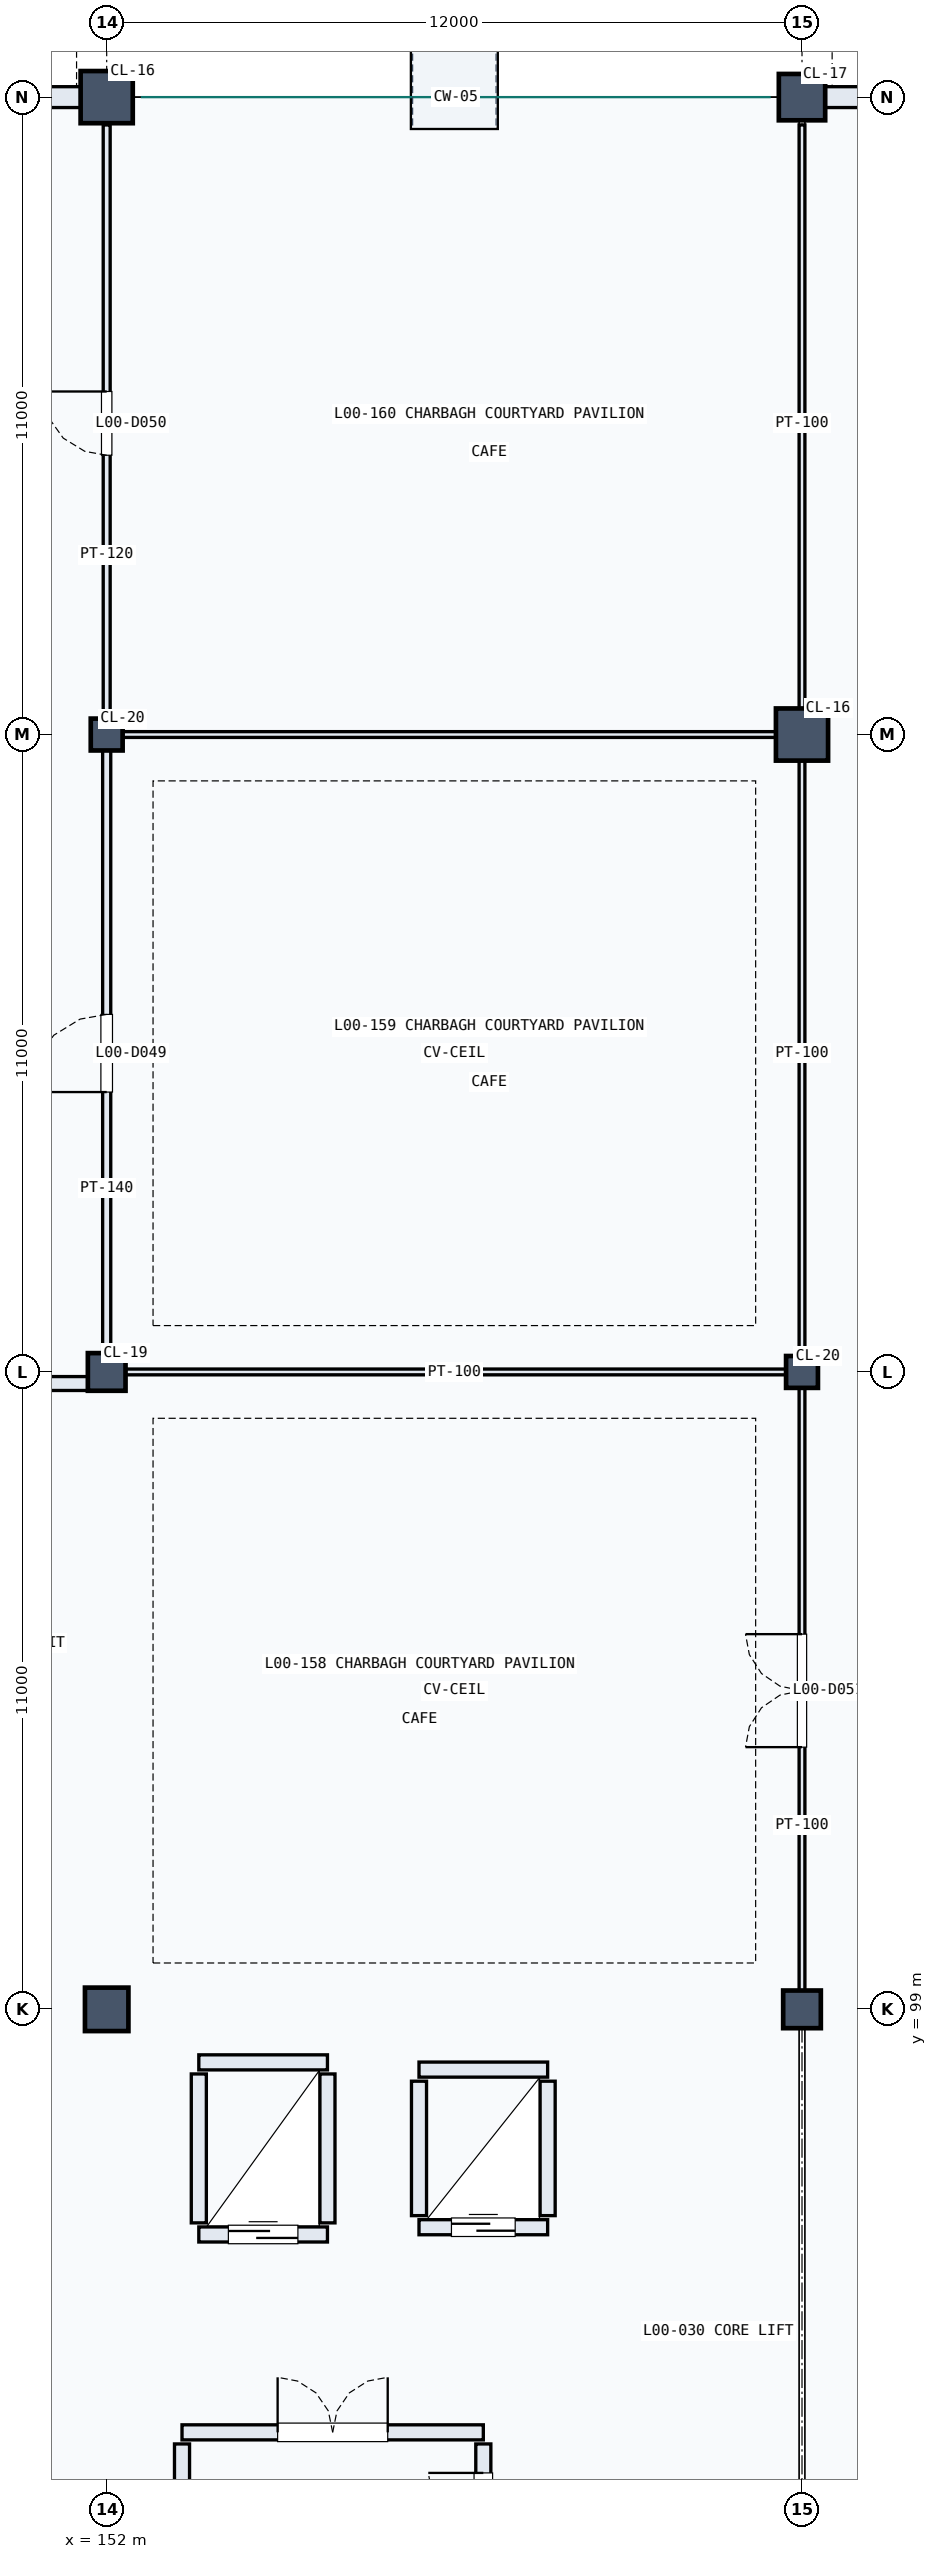
"""IFC4 building model, lengths in metres.
Left out: names, types, materials, properties, quantities, classifications, styles, units other than length and angle.
Written with IfcOpenShell. Run it as: python <this file> out.ifc"""

import sys

from ifc_helpers import new_model, si_unit, direction, frame, frame_2d, origin, origin_2d, place, context, subcontext, project, spatial, rectangle, circle, extrude, element, fill, save


model = new_model("IFC4")
c1 = context("Model", 3, precision=1e-05, world=origin(), true_north=direction((0.0, 1.0)))
c2 = subcontext(c1, "Body", "Model", "MODEL_VIEW")
j1 = project(units=[si_unit("LENGTHUNIT", "METRE"), si_unit("PLANEANGLEUNIT", "RADIAN")], contexts=[c1])
p1 = place(None, origin())
s1 = spatial("IfcSite", under=j1, at=p1, CompositionType="ELEMENT")
p2 = place(p1, origin())
s2 = spatial("IfcBuilding", under=s1, at=p2, CompositionType="ELEMENT")
p3 = place(p2, origin())
s3 = spatial("IfcBuildingStorey", under=s2, at=p3, CompositionType="ELEMENT", Elevation=0.0)
p4 = place(p3, frame((152.0, 99.0, 0.0), z_axis=(0.0, 0.0, 1.0), x_axis=(1.0, 0.0, 0.0)))
e1 = element("IfcColumn", 1, at=p4, inside=s3, PredefinedType="COLUMN", context=c2, shape_type="SweptSolid", body=[
    extrude(circle(Radius=0.375, at=origin_2d()), origin(), (0.0, 0.0, 1.0), 5.4),
])
p5 = place(p3, frame((152.0, 110.0, 0.0), z_axis=(0.0, 0.0, 1.0), x_axis=(1.0, 0.0, 0.0)))
e2 = element("IfcColumn", 2, at=p5, inside=s3, PredefinedType="COLUMN", context=c2, shape_type="SweptSolid", body=[
    extrude(circle(Radius=0.325, at=origin_2d()), origin(), (0.0, 0.0, 1.0), 5.4),
])
p6 = place(p3, frame((152.0, 121.0, 0.0), z_axis=(0.0, 0.0, 1.0), x_axis=(1.0, 0.0, 0.0)))
e3 = element("IfcColumn", 3, at=p6, inside=s3, PredefinedType="COLUMN", context=c2, shape_type="SweptSolid", body=[
    extrude(circle(Radius=0.275, at=origin_2d()), origin(), (0.0, 0.0, 1.0), 5.4),
])
p7 = place(p3, frame((152.0, 132.0, 0.0), z_axis=(0.0, 0.0, 1.0), x_axis=(1.0, 0.0, 0.0)))
e4 = element("IfcColumn", 4, at=p7, inside=s3, PredefinedType="COLUMN", context=c2, shape_type="SweptSolid", body=[
    extrude(circle(Radius=0.45, at=origin_2d()), origin(), (0.0, 0.0, 1.0), 5.4),
])
p8 = place(p3, frame((164.0, 99.0, 0.0), z_axis=(0.0, 0.0, 1.0), x_axis=(1.0, 0.0, 0.0)))
e5 = element("IfcColumn", 5, at=p8, inside=s3, PredefinedType="COLUMN", context=c2, shape_type="SweptSolid", body=[
    extrude(circle(Radius=0.325, at=origin_2d()), origin(), (0.0, 0.0, 1.0), 5.4),
])
p9 = place(p3, frame((164.0, 110.0, 0.0), z_axis=(0.0, 0.0, 1.0), x_axis=(1.0, 0.0, 0.0)))
e6 = element("IfcColumn", 6, at=p9, inside=s3, PredefinedType="COLUMN", context=c2, shape_type="SweptSolid", body=[
    extrude(circle(Radius=0.275, at=origin_2d()), origin(), (0.0, 0.0, 1.0), 5.4),
])
p10 = place(p3, frame((164.0, 121.0, 0.0), z_axis=(0.0, 0.0, 1.0), x_axis=(1.0, 0.0, 0.0)))
e7 = element("IfcColumn", 7, at=p10, inside=s3, PredefinedType="COLUMN", context=c2, shape_type="SweptSolid", body=[
    extrude(circle(Radius=0.45, at=origin_2d()), origin(), (0.0, 0.0, 1.0), 5.4),
])
p11 = place(p3, frame((164.0, 132.0, 0.0), z_axis=(0.0, 0.0, 1.0), x_axis=(1.0, 0.0, 0.0)))
e8 = element("IfcColumn", 8, at=p11, inside=s3, PredefinedType="COLUMN", context=c2, shape_type="SweptSolid", body=[
    extrude(circle(Radius=0.4, at=origin_2d()), origin(), (0.0, 0.0, 1.0), 5.4),
])
p12 = place(p3, frame((142.6, 132.0, 0.0), z_axis=(0.0, 0.0, 1.0), x_axis=(1.0, 0.0, 0.0)))
e9 = element("IfcWall", 9, at=p12, inside=s3, PredefinedType="SOLIDWALL", context=c2, shape_type="SweptSolid", body=[
    extrude(rectangle(XDim=9.18, YDim=0.36, at=frame_2d((4.59, 0.0))), origin(), (0.0, 0.0, 1.0), 5.065),
])
p13 = place(p12, frame((2.99, 0.0, 1.1)))
e10 = element("IfcOpeningElement", 10, at=p13, cuts=e9, PredefinedType="OPENING", context=c2, shape_type="SweptSolid", body=[
    extrude(rectangle(XDim=3.2, YDim=1.4, at=frame_2d((1.6, 0.7))), frame((0.0, 0.19, 0.0), z_axis=(0.0, -1.0, 0.0), x_axis=(1.0, 0.0, 0.0)), (0.0, 0.0, 1.0), 0.38),
])
p14 = place(p3, frame((164.22, 132.0, 0.0), z_axis=(0.0, 0.0, 1.0), x_axis=(1.0, 0.0, 0.0)))
e11 = element("IfcWall", 11, at=p14, inside=s3, PredefinedType="SOLIDWALL", context=c2, shape_type="SweptSolid", body=[
    extrude(rectangle(XDim=11.56, YDim=0.36, at=frame_2d((5.78, 0.0))), origin(), (0.0, 0.0, 1.0), 5.065),
])
p15 = place(p14, frame((1.756, 0.0, 0.0)))
e12 = element("IfcOpeningElement", 12, at=p15, cuts=e11, PredefinedType="OPENING", context=c2, shape_type="SweptSolid", body=[
    extrude(rectangle(XDim=2.2, YDim=2.35, at=frame_2d((1.1, 1.175))), frame((0.0, 0.19, 0.0), z_axis=(0.0, -1.0, 0.0), x_axis=(1.0, 0.0, 0.0)), (0.0, 0.0, 1.0), 0.38),
])
p16 = place(p14, frame((7.304, 0.0, 0.0)))
e13 = element("IfcOpeningElement", 13, at=p16, cuts=e11, PredefinedType="OPENING", context=c2, shape_type="SweptSolid", body=[
    extrude(rectangle(XDim=1.8, YDim=2.3, at=frame_2d((0.9, 1.15))), frame((0.0, 0.19, 0.0), z_axis=(0.0, -1.0, 0.0), x_axis=(1.0, 0.0, 0.0)), (0.0, 0.0, 1.0), 0.38),
])
p17 = place(p14, frame((5.33, 0.0, 0.8)))
e14 = element("IfcOpeningElement", 14, at=p17, cuts=e11, PredefinedType="OPENING", context=c2, shape_type="SweptSolid", body=[
    extrude(rectangle(XDim=0.9, YDim=1.8, at=frame_2d((0.45, 0.9))), frame((0.0, 0.19, 0.0), z_axis=(0.0, -1.0, 0.0), x_axis=(1.0, 0.0, 0.0)), (0.0, 0.0, 1.0), 0.38),
])
p18 = place(p3, frame((153.59, 95.115, 0.0), z_axis=(0.0, 0.0, 1.0), x_axis=(1.0, 0.0, 0.0)))
e15 = element("IfcWall", 15, at=p18, inside=s3, PredefinedType="SOLIDWALL", context=c2, shape_type="SweptSolid", body=[
    extrude(rectangle(XDim=2.22, YDim=0.26, at=frame_2d((1.11, 0.0))), origin(), (0.0, 0.0, 1.0), 5.06),
])
p19 = place(p18, frame((0.51, 0.0, 0.0)))
e16 = element("IfcOpeningElement", 16, at=p19, cuts=e15, PredefinedType="OPENING", context=c2, shape_type="SweptSolid", body=[
    extrude(rectangle(XDim=1.2, YDim=2.2, at=frame_2d((0.6, 1.1))), frame((0.0, 0.14, 0.0), z_axis=(0.0, -1.0, 0.0), x_axis=(1.0, 0.0, 0.0)), (0.0, 0.0, 1.0), 0.28),
])
p20 = place(p3, frame((153.59, 98.085, 0.0), z_axis=(0.0, 0.0, 1.0), x_axis=(1.0, 0.0, 0.0)))
e17 = element("IfcWall", 17, at=p20, inside=s3, PredefinedType="SOLIDWALL", context=c2, shape_type="SweptSolid", body=[
    extrude(rectangle(XDim=2.22, YDim=0.26, at=frame_2d((1.11, 0.0))), origin(), (0.0, 0.0, 1.0), 5.06),
])
for number, where, z_axis, x_axis in (
    (18, (153.59, 95.315, 0.0), (0.0, 0.0, 1.0), (0.0, 1.0, 0.0)),
    (19, (155.81, 95.315, 0.0), (0.0, 0.0, 1.0), (0.0, 1.0, 0.0)),
):
    element("IfcWall", number, at=place(p3, frame(where, z_axis=z_axis, x_axis=x_axis)), inside=s3, PredefinedType="SOLIDWALL", context=c2, shape_type="SweptSolid", body=[
        extrude(rectangle(XDim=2.57, YDim=0.26, at=frame_2d((1.285, 0.0))), origin(), (0.0, 0.0, 1.0), 5.06),
    ])
p21 = place(p3, frame((157.39, 95.24, 0.0), z_axis=(0.0, 0.0, 1.0), x_axis=(1.0, 0.0, 0.0)))
e20 = element("IfcWall", 20, at=p21, inside=s3, PredefinedType="SOLIDWALL", context=c2, shape_type="SweptSolid", body=[
    extrude(rectangle(XDim=2.22, YDim=0.26, at=frame_2d((1.11, 0.0))), origin(), (0.0, 0.0, 1.0), 5.06),
])
p22 = place(p21, frame((0.56, 0.0, 0.0)))
e21 = element("IfcOpeningElement", 21, at=p22, cuts=e20, PredefinedType="OPENING", context=c2, shape_type="SweptSolid", body=[
    extrude(rectangle(XDim=1.1, YDim=2.15, at=frame_2d((0.55, 1.075))), frame((0.0, 0.14, 0.0), z_axis=(0.0, -1.0, 0.0), x_axis=(1.0, 0.0, 0.0)), (0.0, 0.0, 1.0), 0.28),
])
p23 = place(p3, frame((157.39, 97.96, 0.0), z_axis=(0.0, 0.0, 1.0), x_axis=(1.0, 0.0, 0.0)))
e22 = element("IfcWall", 22, at=p23, inside=s3, PredefinedType="SOLIDWALL", context=c2, shape_type="SweptSolid", body=[
    extrude(rectangle(XDim=2.22, YDim=0.26, at=frame_2d((1.11, 0.0))), origin(), (0.0, 0.0, 1.0), 5.06),
])
for number, where, z_axis, x_axis in (
    (23, (157.39, 95.44, 0.0), (0.0, 0.0, 1.0), (0.0, 1.0, 0.0)),
    (24, (159.61, 95.44, 0.0), (0.0, 0.0, 1.0), (0.0, 1.0, 0.0)),
):
    element("IfcWall", number, at=place(p3, frame(where, z_axis=z_axis, x_axis=x_axis)), inside=s3, PredefinedType="SOLIDWALL", context=c2, shape_type="SweptSolid", body=[
        extrude(rectangle(XDim=2.32, YDim=0.26, at=frame_2d((1.16, 0.0))), origin(), (0.0, 0.0, 1.0), 5.06),
    ])
p24 = place(p3, frame((153.3, 91.7, 0.0), z_axis=(0.0, 0.0, 1.0), x_axis=(1.0, 0.0, 0.0)))
e25 = element("IfcWall", 25, at=p24, inside=s3, PredefinedType="SOLIDWALL", context=c2, shape_type="SweptSolid", body=[
    extrude(rectangle(XDim=5.2, YDim=0.26, at=frame_2d((2.6, 0.0))), origin(), (0.0, 0.0, 1.0), 5.06),
])
p25 = place(p24, frame((1.65, 0.0, 0.0)))
e26 = element("IfcOpeningElement", 26, at=p25, cuts=e25, PredefinedType="OPENING", context=c2, shape_type="SweptSolid", body=[
    extrude(rectangle(XDim=1.9, YDim=2.2, at=frame_2d((0.95, 1.1))), frame((0.0, 0.14, 0.0), z_axis=(0.0, -1.0, 0.0), x_axis=(1.0, 0.0, 0.0)), (0.0, 0.0, 1.0), 0.28),
])
p26 = place(p3, frame((153.3, 88.6, 0.0), z_axis=(0.0, 0.0, 1.0), x_axis=(0.0, 1.0, 0.0)))
e27 = element("IfcWall", 27, at=p26, inside=s3, PredefinedType="SOLIDWALL", context=c2, shape_type="SweptSolid", body=[
    extrude(rectangle(XDim=2.9, YDim=0.26, at=frame_2d((1.45, 0.0))), origin(), (0.0, 0.0, 1.0), 5.06),
])
p27 = place(p3, frame((158.5, 88.6, 0.0), z_axis=(0.0, 0.0, 1.0), x_axis=(0.0, 1.0, 0.0)))
e28 = element("IfcWall", 28, at=p27, inside=s3, PredefinedType="SOLIDWALL", context=c2, shape_type="SweptSolid", body=[
    extrude(rectangle(XDim=2.9, YDim=0.26, at=frame_2d((1.45, 0.0))), origin(), (0.0, 0.0, 1.0), 5.06),
])
p28 = place(p27, frame((0.5, 0.0, 0.0)))
e29 = element("IfcOpeningElement", 29, at=p28, cuts=e28, PredefinedType="OPENING", context=c2, shape_type="SweptSolid", body=[
    extrude(rectangle(XDim=1.9, YDim=2.2, at=frame_2d((0.95, 1.1))), frame((0.0, 0.14, 0.0), z_axis=(0.0, -1.0, 0.0), x_axis=(1.0, 0.0, 0.0)), (0.0, 0.0, 1.0), 0.28),
])
p29 = place(p3, frame((152.0, 110.22, 0.0), z_axis=(0.0, 0.0, 1.0), x_axis=(0.0, 1.0, 0.0)))
e30 = element("IfcWall", 30, at=p29, inside=s3, PredefinedType="PARTITIONING", context=c2, shape_type="SweptSolid", body=[
    extrude(rectangle(XDim=10.56, YDim=0.14, at=frame_2d((5.28, 0.0))), origin(), (0.0, 0.0, 1.0), 4.1),
])
p30 = place(p29, frame((4.61, 0.0, 0.0)))
e31 = element("IfcOpeningElement", 31, at=p30, cuts=e30, PredefinedType="OPENING", context=c2, shape_type="SweptSolid", body=[
    extrude(rectangle(XDim=1.34, YDim=2.15, at=frame_2d((0.67, 1.075))), frame((0.0, 0.08, 0.0), z_axis=(0.0, -1.0, 0.0), x_axis=(1.0, 0.0, 0.0)), (0.0, 0.0, 1.0), 0.16),
])
p31 = place(p3, frame((152.0, 121.22, 0.0), z_axis=(0.0, 0.0, 1.0), x_axis=(0.0, 1.0, 0.0)))
e32 = element("IfcWall", 32, at=p31, inside=s3, PredefinedType="PARTITIONING", context=c2, shape_type="SweptSolid", body=[
    extrude(rectangle(XDim=10.3, YDim=0.12, at=frame_2d((5.15, 0.0))), origin(), (0.0, 0.0, 1.0), 4.25),
])
p32 = place(p31, frame((4.6, 0.0, 0.0)))
e33 = element("IfcOpeningElement", 33, at=p32, cuts=e32, PredefinedType="OPENING", context=c2, shape_type="SweptSolid", body=[
    extrude(rectangle(XDim=1.1, YDim=2.1, at=frame_2d((0.55, 1.05))), frame((0.0, 0.07, 0.0), z_axis=(0.0, -1.0, 0.0), x_axis=(1.0, 0.0, 0.0)), (0.0, 0.0, 1.0), 0.14),
])
p33 = place(p3, frame((164.0, 99.22, 0.0), z_axis=(0.0, 0.0, 1.0), x_axis=(0.0, 1.0, 0.0)))
e34 = element("IfcWall", 34, at=p33, inside=s3, PredefinedType="PARTITIONING", context=c2, shape_type="SweptSolid", body=[
    extrude(rectangle(XDim=10.56, YDim=0.1, at=frame_2d((5.28, 0.0))), origin(), (0.0, 0.0, 1.0), 4.3),
])
p34 = place(p33, frame((4.305, 0.0, 0.0)))
e35 = element("IfcOpeningElement", 35, at=p34, cuts=e34, PredefinedType="OPENING", context=c2, shape_type="SweptSolid", body=[
    extrude(rectangle(XDim=1.95, YDim=2.4, at=frame_2d((0.975, 1.2))), frame((0.0, 0.06, 0.0), z_axis=(0.0, -1.0, 0.0), x_axis=(1.0, 0.0, 0.0)), (0.0, 0.0, 1.0), 0.12),
])
p35 = place(p3, frame((164.0, 110.22, 0.0), z_axis=(0.0, 0.0, 1.0), x_axis=(0.0, 1.0, 0.0)))
e36 = element("IfcWall", 36, at=p35, inside=s3, PredefinedType="PARTITIONING", context=c2, shape_type="SweptSolid", body=[
    extrude(rectangle(XDim=10.56, YDim=0.1, at=frame_2d((5.28, 0.0))), origin(), (0.0, 0.0, 1.0), 4.35),
])
p36 = place(p3, frame((164.0, 121.22, 0.0), z_axis=(0.0, 0.0, 1.0), x_axis=(0.0, 1.0, 0.0)))
e37 = element("IfcWall", 37, at=p36, inside=s3, PredefinedType="PARTITIONING", context=c2, shape_type="SweptSolid", body=[
    extrude(rectangle(XDim=10.3, YDim=0.1, at=frame_2d((5.15, 0.0))), origin(), (0.0, 0.0, 1.0), 4.45),
])
p37 = place(p3, frame((152.22, 110.0, 0.0), z_axis=(0.0, 0.0, 1.0), x_axis=(1.0, 0.0, 0.0)))
e38 = element("IfcWall", 38, at=p37, inside=s3, PredefinedType="PARTITIONING", context=c2, shape_type="SweptSolid", body=[
    extrude(rectangle(XDim=11.56, YDim=0.1, at=frame_2d((5.78, 0.0))), origin(), (0.0, 0.0, 1.0), 4.1),
])
p38 = place(p3, frame((152.22, 121.0, 0.0), z_axis=(0.0, 0.0, 1.0), x_axis=(1.0, 0.0, 0.0)))
e39 = element("IfcWall", 39, at=p38, inside=s3, PredefinedType="PARTITIONING", context=c2, shape_type="SweptSolid", body=[
    extrude(rectangle(XDim=11.56, YDim=0.1, at=frame_2d((5.78, 0.0))), origin(), (0.0, 0.0, 1.0), 4.25),
])
p39 = place(p3, frame((142.6, 109.8, 0.0), z_axis=(0.0, 0.0, 1.0), x_axis=(1.0, 0.0, 0.0)))
e40 = element("IfcWall", 40, at=p39, inside=s3, PredefinedType="PARTITIONING", context=c2, shape_type="SweptSolid", body=[
    extrude(rectangle(XDim=9.18, YDim=0.24, at=frame_2d((4.59, 0.0))), origin(), (0.0, 0.0, 1.0), 4.1),
])
p40 = place(p39, frame((3.59, 0.0, 0.0)))
e41 = element("IfcOpeningElement", 41, at=p40, cuts=e40, PredefinedType="OPENING", context=c2, shape_type="SweptSolid", body=[
    extrude(rectangle(XDim=2.0, YDim=2.25, at=frame_2d((1.0, 1.125))), frame((0.0, 0.13, 0.0), z_axis=(0.0, -1.0, 0.0), x_axis=(1.0, 0.0, 0.0)), (0.0, 0.0, 1.0), 0.26),
])
p41 = place(p19, origin())
e42 = element("IfcDoor", 42, at=p41, inside=s3, OperationType="SLIDING_TO_LEFT", PredefinedType="DOOR", context=c2, shape_type="SweptSolid", body=[
    extrude(rectangle(XDim=1.2, YDim=2.2, at=frame_2d((0.6, 1.1))), frame((0.0, 0.025, 0.0), z_axis=(0.0, -1.0, 0.0), x_axis=(1.0, 0.0, 0.0)), (0.0, 0.0, 1.0), 0.05),
])
fill(e16, e42)
p42 = place(p22, origin())
e43 = element("IfcDoor", 43, at=p42, inside=s3, OperationType="SLIDING_TO_LEFT", PredefinedType="DOOR", context=c2, shape_type="SweptSolid", body=[
    extrude(rectangle(XDim=1.1, YDim=2.15, at=frame_2d((0.55, 1.075))), frame((0.0, 0.025, 0.0), z_axis=(0.0, -1.0, 0.0), x_axis=(1.0, 0.0, 0.0)), (0.0, 0.0, 1.0), 0.05),
])
fill(e21, e43)
p43 = place(p25, origin())
e44 = element("IfcDoor", 44, at=p43, inside=s3, OperationType="DOUBLE_DOOR_SINGLE_SWING", PredefinedType="DOOR", context=c2, shape_type="SweptSolid", body=[
    extrude(rectangle(XDim=1.9, YDim=2.2, at=frame_2d((0.95, 1.1))), frame((0.0, 0.025, 0.0), z_axis=(0.0, -1.0, 0.0), x_axis=(1.0, 0.0, 0.0)), (0.0, 0.0, 1.0), 0.05),
])
fill(e26, e44)
p44 = place(p28, origin())
e45 = element("IfcDoor", 45, at=p44, inside=s3, OperationType="DOUBLE_DOOR_SINGLE_SWING", PredefinedType="DOOR", context=c2, shape_type="SweptSolid", body=[
    extrude(rectangle(XDim=1.9, YDim=2.2, at=frame_2d((0.95, 1.1))), frame((0.0, 0.025, 0.0), z_axis=(0.0, -1.0, 0.0), x_axis=(1.0, 0.0, 0.0)), (0.0, 0.0, 1.0), 0.05),
])
fill(e29, e45)
p45 = place(p30, origin())
e46 = element("IfcDoor", 46, at=p45, inside=s3, OperationType="SINGLE_SWING_LEFT", PredefinedType="DOOR", context=c2, shape_type="SweptSolid", body=[
    extrude(rectangle(XDim=1.34, YDim=2.15, at=frame_2d((0.67, 1.075))), frame((0.0, 0.025, 0.0), z_axis=(0.0, -1.0, 0.0), x_axis=(1.0, 0.0, 0.0)), (0.0, 0.0, 1.0), 0.05),
])
fill(e31, e46)
p46 = place(p32, origin())
e47 = element("IfcDoor", 47, at=p46, inside=s3, OperationType="SINGLE_SWING_RIGHT", PredefinedType="DOOR", context=c2, shape_type="SweptSolid", body=[
    extrude(rectangle(XDim=1.1, YDim=2.1, at=frame_2d((0.55, 1.05))), frame((0.0, 0.025, 0.0), z_axis=(0.0, -1.0, 0.0), x_axis=(1.0, 0.0, 0.0)), (0.0, 0.0, 1.0), 0.05),
])
fill(e33, e47)
p47 = place(p34, origin())
e48 = element("IfcDoor", 48, at=p47, inside=s3, OperationType="DOUBLE_DOOR_SINGLE_SWING", PredefinedType="DOOR", context=c2, shape_type="SweptSolid", body=[
    extrude(rectangle(XDim=1.95, YDim=2.4, at=frame_2d((0.975, 1.2))), frame((0.0, 0.025, 0.0), z_axis=(0.0, -1.0, 0.0), x_axis=(1.0, 0.0, 0.0)), (0.0, 0.0, 1.0), 0.05),
])
fill(e35, e48)
save(model, sys.argv[1])
